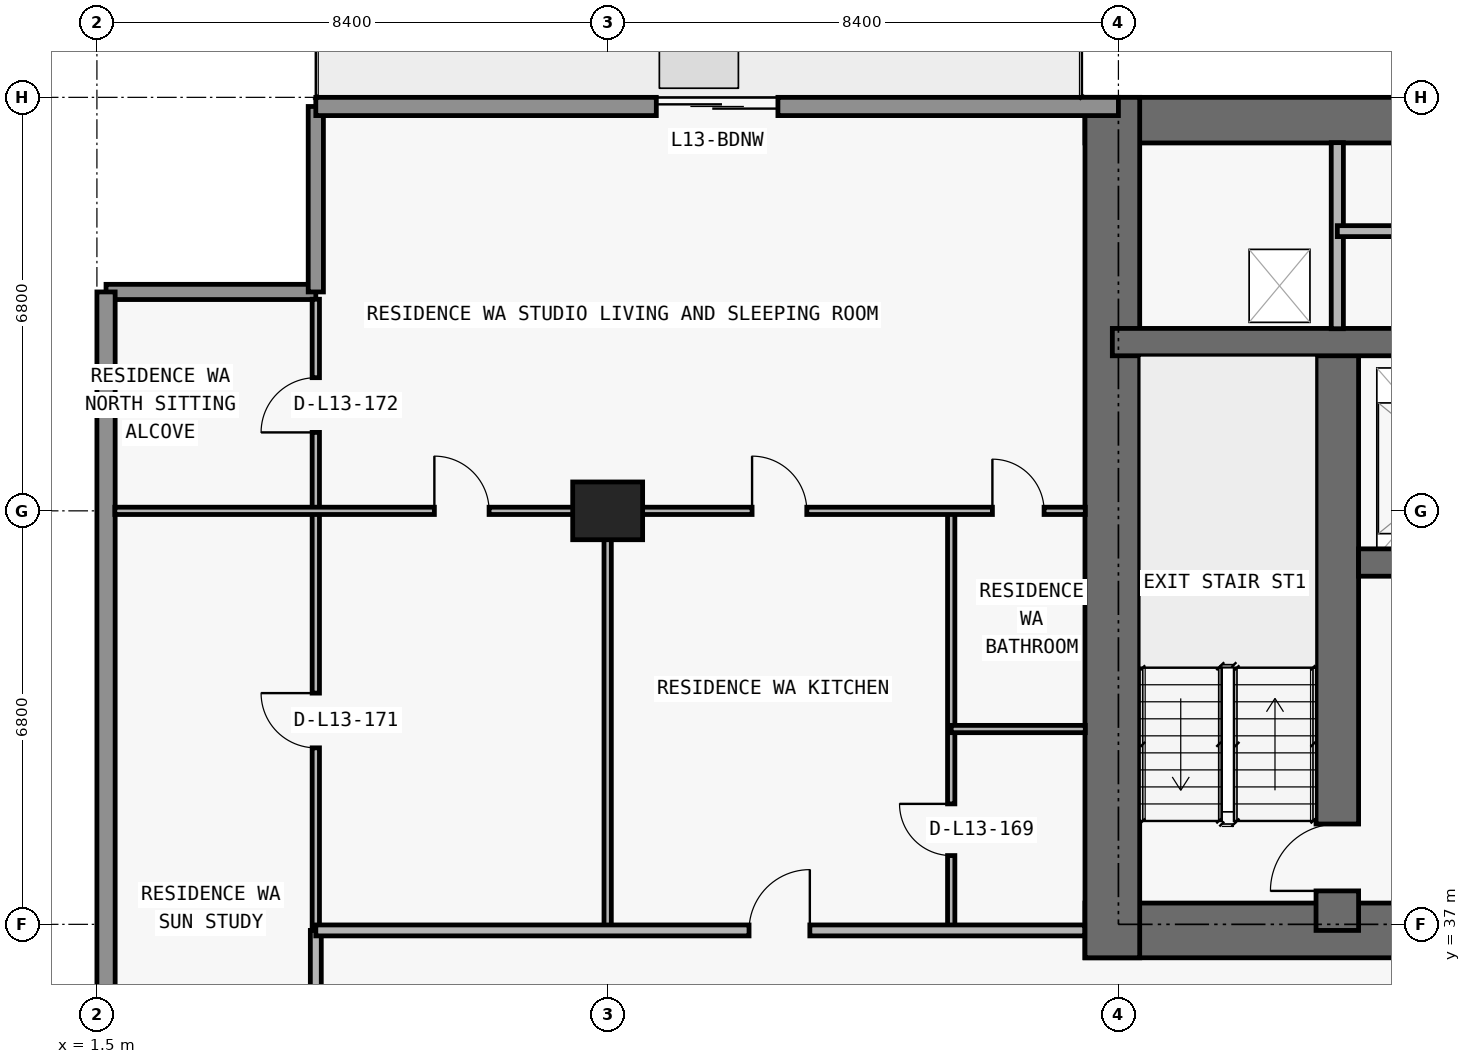
"""IFC4 building model, lengths in metres.
Left out: names, types, materials, properties, quantities, classifications, styles, units other than length and angle.
Written with IfcOpenShell. Run it as: python <this file> out.ifc"""

import sys

from ifc_helpers import new_model, si_unit, direction, frame, frame_2d, origin, origin_2d, place, context, subcontext, project, spatial, rectangle, extrude, element, fill, save


model = new_model("IFC4")
c1 = context("Model", 3, precision=1e-05, world=origin(), true_north=direction((0.0, 1.0)))
c2 = subcontext(c1, "Body", "Model", "MODEL_VIEW")
j1 = project(units=[si_unit("LENGTHUNIT", "METRE"), si_unit("PLANEANGLEUNIT", "RADIAN")], contexts=[c1])
p1 = place(None, origin())
s1 = spatial("IfcSite", under=j1, at=p1, CompositionType="ELEMENT")
p2 = place(p1, origin())
s2 = spatial("IfcBuilding", under=s1, at=p2, CompositionType="ELEMENT")
p3 = place(p2, frame((0.0, 0.0, 53.1)))
s3 = spatial("IfcBuildingStorey", under=s2, at=p3, CompositionType="ELEMENT", Elevation=53.1)
p4 = place(p3, frame((9.9, 43.8, 0.0), z_axis=(0.0, 0.0, 1.0), x_axis=(1.0, 0.0, 0.0)))
e1 = element("IfcColumn", 1, at=p4, inside=s3, PredefinedType="COLUMN", context=c2, shape_type="SweptSolid", body=[
    extrude(rectangle(XDim=1.15, YDim=0.95, at=origin_2d()), origin(), (0.0, 0.0, 1.0), 3.05),
])
p5 = place(p3, frame((17.75, 36.9, 0.0), z_axis=(0.0, 0.0, 1.0), x_axis=(1.0, 0.0, 0.0)))
e2 = element("IfcWall", 2, at=p5, inside=s3, PredefinedType="SHEAR", context=c2, shape_type="SweptSolid", body=[
    extrude(rectangle(XDim=42.3, YDim=0.9, at=frame_2d((21.15, 0.0))), origin(), (0.0, 0.0, 1.0), 3.05),
])
p6 = place(p5, frame((14.55, 0.0, 0.0)))
e3 = element("IfcOpeningElement", 3, at=p6, cuts=e2, PredefinedType="OPENING", context=c2, shape_type="SweptSolid", body=[
    extrude(rectangle(XDim=1.1, YDim=2.15, at=frame_2d((0.55, 1.075))), frame((0.0, 0.46, 0.0), z_axis=(0.0, -1.0, 0.0), x_axis=(1.0, 0.0, 0.0)), (0.0, 0.0, 1.0), 0.92),
])
p7 = place(p5, frame((6.4, 0.0, 0.0)))
e4 = element("IfcOpeningElement", 4, at=p7, cuts=e2, PredefinedType="OPENING", context=c2, shape_type="SweptSolid", body=[
    extrude(rectangle(XDim=1.05, YDim=2.15, at=frame_2d((0.525, 1.075))), frame((0.0, 0.46, 0.0), z_axis=(0.0, -1.0, 0.0), x_axis=(1.0, 0.0, 0.0)), (0.0, 0.0, 1.0), 0.92),
])
p8 = place(p5, frame((34.9, 0.0, 0.0)))
e5 = element("IfcOpeningElement", 5, at=p8, cuts=e2, PredefinedType="OPENING", context=c2, shape_type="SweptSolid", body=[
    extrude(rectangle(XDim=1.05, YDim=2.15, at=frame_2d((0.525, 1.075))), frame((0.0, 0.46, 0.0), z_axis=(0.0, -1.0, 0.0), x_axis=(1.0, 0.0, 0.0)), (0.0, 0.0, 1.0), 0.92),
])
p9 = place(p5, frame((11.012, 0.0, 0.0)))
e6 = element("IfcOpeningElement", 6, at=p9, cuts=e2, PredefinedType="OPENING", context=c2, shape_type="SweptSolid", body=[
    extrude(rectangle(XDim=1.05, YDim=2.15, at=frame_2d((0.525, 1.075))), frame((0.0, 0.46, 0.0), z_axis=(0.0, -1.0, 0.0), x_axis=(1.0, 0.0, 0.0)), (0.0, 0.0, 1.0), 0.92),
])
p10 = place(p5, frame((24.25, 0.0, 0.0)))
e7 = element("IfcOpeningElement", 7, at=p10, cuts=e2, PredefinedType="OPENING", context=c2, shape_type="SweptSolid", body=[
    extrude(rectangle(XDim=1.05, YDim=2.15, at=frame_2d((0.525, 1.075))), frame((0.0, 0.46, 0.0), z_axis=(0.0, -1.0, 0.0), x_axis=(1.0, 0.0, 0.0)), (0.0, 0.0, 1.0), 0.92),
])
p11 = place(p3, frame((17.75, 50.225, 0.0), z_axis=(0.0, 0.0, 1.0), x_axis=(1.0, 0.0, 0.0)))
e8 = element("IfcWall", 8, at=p11, inside=s3, PredefinedType="SHEAR", context=c2, shape_type="SweptSolid", body=[
    extrude(rectangle(XDim=42.3, YDim=0.75, at=frame_2d((21.15, 0.0))), origin(), (0.0, 0.0, 1.0), 3.05),
])
p12 = place(p3, frame((18.2, 36.45, 0.0), z_axis=(0.0, 0.0, 1.0), x_axis=(0.0, 1.0, 0.0)))
e9 = element("IfcWall", 9, at=p12, inside=s3, PredefinedType="SHEAR", context=c2, shape_type="SweptSolid", body=[
    extrude(rectangle(XDim=14.15, YDim=0.9, at=frame_2d((7.075, 0.0))), origin(), (0.0, 0.0, 1.0), 3.05),
])
p13 = place(p3, frame((21.9, 36.9, 0.0), z_axis=(0.0, 0.0, 1.0), x_axis=(0.0, 1.0, 0.0)))
e10 = element("IfcWall", 10, at=p13, inside=s3, PredefinedType="SHEAR", context=c2, shape_type="SweptSolid", body=[
    extrude(rectangle(XDim=9.675, YDim=0.7, at=frame_2d((4.837, 0.0))), origin(), (0.0, 0.0, 1.0), 3.05),
])
p14 = place(p13, frame((0.65, 0.0, 0.0)))
e11 = element("IfcOpeningElement", 11, at=p14, cuts=e10, PredefinedType="OPENING", context=c2, shape_type="SweptSolid", body=[
    extrude(rectangle(XDim=1.1, YDim=2.15, at=frame_2d((0.55, 1.075))), frame((0.0, 0.36, 0.0), z_axis=(0.0, -1.0, 0.0), x_axis=(1.0, 0.0, 0.0)), (0.0, 0.0, 1.0), 0.72),
])
p15 = place(p3, frame((22.25, 42.95, 0.0), z_axis=(0.0, 0.0, 1.0), x_axis=(1.0, 0.0, 0.0)))
e12 = element("IfcWall", 12, at=p15, inside=s3, PredefinedType="SHEAR", context=c2, shape_type="SweptSolid", body=[
    extrude(rectangle(XDim=33.3, YDim=0.45, at=frame_2d((16.65, 0.0))), origin(), (0.0, 0.0, 1.0), 3.05),
])
p16 = place(p15, frame((1.05, 0.0, 0.0)))
e13 = element("IfcOpeningElement", 13, at=p16, cuts=e12, PredefinedType="OPENING", context=c2, shape_type="SweptSolid", body=[
    extrude(rectangle(XDim=1.2, YDim=2.2, at=frame_2d((0.6, 1.1))), frame((0.0, 0.235, 0.0), z_axis=(0.0, -1.0, 0.0), x_axis=(1.0, 0.0, 0.0)), (0.0, 0.0, 1.0), 0.47),
])
p17 = place(p15, frame((31.05, 0.0, 0.0)))
e14 = element("IfcOpeningElement", 14, at=p17, cuts=e12, PredefinedType="OPENING", context=c2, shape_type="SweptSolid", body=[
    extrude(rectangle(XDim=1.2, YDim=2.2, at=frame_2d((0.6, 1.1))), frame((0.0, 0.235, 0.0), z_axis=(0.0, -1.0, 0.0), x_axis=(1.0, 0.0, 0.0)), (0.0, 0.0, 1.0), 0.47),
])
p18 = place(p15, frame((13.5, 0.0, 0.0)))
e15 = element("IfcOpeningElement", 15, at=p18, cuts=e12, PredefinedType="OPENING", context=c2, shape_type="SweptSolid", body=[
    extrude(rectangle(XDim=1.1, YDim=2.2, at=frame_2d((0.55, 1.1))), frame((0.0, 0.235, 0.0), z_axis=(0.0, -1.0, 0.0), x_axis=(1.0, 0.0, 0.0)), (0.0, 0.0, 1.0), 0.47),
])
p19 = place(p15, frame((16.1, 0.0, 0.0)))
e16 = element("IfcOpeningElement", 16, at=p19, cuts=e12, PredefinedType="OPENING", context=c2, shape_type="SweptSolid", body=[
    extrude(rectangle(XDim=1.1, YDim=2.2, at=frame_2d((0.55, 1.1))), frame((0.0, 0.235, 0.0), z_axis=(0.0, -1.0, 0.0), x_axis=(1.0, 0.0, 0.0)), (0.0, 0.0, 1.0), 0.47),
])
p20 = place(p15, frame((18.7, 0.0, 0.0)))
e17 = element("IfcOpeningElement", 17, at=p20, cuts=e12, PredefinedType="OPENING", context=c2, shape_type="SweptSolid", body=[
    extrude(rectangle(XDim=1.1, YDim=2.2, at=frame_2d((0.55, 1.1))), frame((0.0, 0.235, 0.0), z_axis=(0.0, -1.0, 0.0), x_axis=(1.0, 0.0, 0.0)), (0.0, 0.0, 1.0), 0.47),
])
p21 = place(p15, frame((3.625, 0.0, 0.0)))
e18 = element("IfcOpeningElement", 18, at=p21, cuts=e12, PredefinedType="OPENING", context=c2, shape_type="SweptSolid", body=[
    extrude(rectangle(XDim=1.05, YDim=2.15, at=frame_2d((0.525, 1.075))), frame((0.0, 0.235, 0.0), z_axis=(0.0, -1.0, 0.0), x_axis=(1.0, 0.0, 0.0)), (0.0, 0.0, 1.0), 0.47),
])
p22 = place(p15, frame((28.675, 0.0, 0.0)))
e19 = element("IfcOpeningElement", 19, at=p22, cuts=e12, PredefinedType="OPENING", context=c2, shape_type="SweptSolid", body=[
    extrude(rectangle(XDim=1.05, YDim=2.15, at=frame_2d((0.525, 1.075))), frame((0.0, 0.235, 0.0), z_axis=(0.0, -1.0, 0.0), x_axis=(1.0, 0.0, 0.0)), (0.0, 0.0, 1.0), 0.47),
])
p23 = place(p3, frame((18.2, 46.575, 0.0), z_axis=(0.0, 0.0, 1.0), x_axis=(1.0, 0.0, 0.0)))
e20 = element("IfcWall", 20, at=p23, inside=s3, PredefinedType="SHEAR", context=c2, shape_type="SweptSolid", body=[
    extrude(rectangle(XDim=41.4, YDim=0.45, at=frame_2d((20.7, 0.0))), origin(), (0.0, 0.0, 1.0), 3.05),
])
p24 = place(p23, frame((7.675, 0.0, 0.0)))
e21 = element("IfcOpeningElement", 21, at=p24, cuts=e20, PredefinedType="OPENING", context=c2, shape_type="SweptSolid", body=[
    extrude(rectangle(XDim=1.05, YDim=2.15, at=frame_2d((0.525, 1.075))), frame((0.0, 0.235, 0.0), z_axis=(0.0, -1.0, 0.0), x_axis=(1.0, 0.0, 0.0)), (0.0, 0.0, 1.0), 0.47),
])
p25 = place(p23, frame((32.725, 0.0, 0.0)))
e22 = element("IfcOpeningElement", 22, at=p25, cuts=e20, PredefinedType="OPENING", context=c2, shape_type="SweptSolid", body=[
    extrude(rectangle(XDim=1.05, YDim=2.15, at=frame_2d((0.525, 1.075))), frame((0.0, 0.235, 0.0), z_axis=(0.0, -1.0, 0.0), x_axis=(1.0, 0.0, 0.0)), (0.0, 0.0, 1.0), 0.47),
])
p26 = place(p3, frame((1.65, 47.4, 0.0), z_axis=(0.0, 0.0, 1.0), x_axis=(1.0, 0.0, 0.0)))
e23 = element("IfcWall", 23, at=p26, inside=s3, PredefinedType="ELEMENTEDWALL", context=c2, shape_type="SweptSolid", body=[
    extrude(rectangle(XDim=3.45, YDim=0.25, at=frame_2d((1.725, 0.0))), origin(), (0.0, 0.0, 1.0), 3.05),
])
p27 = place(p3, frame((5.1, 47.4, 0.0), z_axis=(0.0, 0.0, 1.0), x_axis=(0.0, 1.0, 0.0)))
e24 = element("IfcWall", 24, at=p27, inside=s3, PredefinedType="ELEMENTEDWALL", context=c2, shape_type="SweptSolid", body=[
    extrude(rectangle(XDim=3.05, YDim=0.25, at=frame_2d((1.525, 0.0))), origin(), (0.0, 0.0, 1.0), 3.05),
])
p28 = place(p3, frame((1.65, 26.8, 0.0), z_axis=(0.0, 0.0, 1.0), x_axis=(0.0, 1.0, 0.0)))
e25 = element("IfcWall", 25, at=p28, inside=s3, PredefinedType="STANDARD", context=c2, shape_type="SweptSolid", body=[
    extrude(rectangle(XDim=20.6, YDim=0.3, at=frame_2d((10.3, 0.0))), origin(), (0.0, 0.0, 1.0), 3.05),
])
p29 = place(p3, frame((5.1, 50.45, 0.0), z_axis=(0.0, 0.0, 1.0), x_axis=(1.0, 0.0, 0.0)))
e26 = element("IfcWall", 26, at=p29, inside=s3, PredefinedType="STANDARD", context=c2, shape_type="SweptSolid", body=[
    extrude(rectangle(XDim=13.2, YDim=0.3, at=frame_2d((6.6, 0.0))), origin(), (0.0, 0.0, 1.0), 3.05),
])
p30 = place(p29, frame((5.6, 0.0, 0.0)))
e27 = element("IfcOpeningElement", 27, at=p30, cuts=e26, PredefinedType="OPENING", context=c2, shape_type="SweptSolid", body=[
    extrude(rectangle(XDim=2.0, YDim=2.3, at=frame_2d((1.0, 1.15))), frame((0.0, 0.16, 0.0), z_axis=(0.0, -1.0, 0.0), x_axis=(1.0, 0.0, 0.0)), (0.0, 0.0, 1.0), 0.32),
])
p31 = place(p3, frame((5.1, 34.605, 0.0), z_axis=(0.0, 0.0, 1.0), x_axis=(0.0, 1.0, 0.0)))
e28 = element("IfcWall", 28, at=p31, inside=s3, PredefinedType="PARTITIONING", context=c2, shape_type="SweptSolid", body=[
    extrude(rectangle(XDim=2.295, YDim=0.18, at=frame_2d((1.147, 0.0))), origin(), (0.0, 0.0, 1.0), 3.05),
])
p32 = place(p3, frame((5.1, 36.905, 0.0), z_axis=(0.0, 0.0, 1.0), x_axis=(0.0, 1.0, 0.0)))
e29 = element("IfcWall", 29, at=p32, inside=s3, PredefinedType="PARTITIONING", context=c2, shape_type="SweptSolid", body=[
    extrude(rectangle(XDim=10.375, YDim=0.12, at=frame_2d((5.188, 0.0))), origin(), (0.0, 0.0, 1.0), 3.05),
])
p33 = place(p32, frame((2.998, 0.0, 0.0)))
e30 = element("IfcOpeningElement", 30, at=p33, cuts=e29, PredefinedType="OPENING", context=c2, shape_type="SweptSolid", body=[
    extrude(rectangle(XDim=0.9, YDim=2.15, at=frame_2d((0.45, 1.075))), frame((0.0, 0.07, 0.0), z_axis=(0.0, -1.0, 0.0), x_axis=(1.0, 0.0, 0.0)), (0.0, 0.0, 1.0), 0.14),
])
p34 = place(p32, frame((8.185, 0.0, 0.0)))
e31 = element("IfcOpeningElement", 31, at=p34, cuts=e29, PredefinedType="OPENING", context=c2, shape_type="SweptSolid", body=[
    extrude(rectangle(XDim=0.9, YDim=2.15, at=frame_2d((0.45, 1.075))), frame((0.0, 0.07, 0.0), z_axis=(0.0, -1.0, 0.0), x_axis=(1.0, 0.0, 0.0)), (0.0, 0.0, 1.0), 0.14),
])
p35 = place(p3, frame((9.9, 36.9, 0.0), z_axis=(0.0, 0.0, 1.0), x_axis=(0.0, 1.0, 0.0)))
e32 = element("IfcWall", 32, at=p35, inside=s3, PredefinedType="PARTITIONING", context=c2, shape_type="SweptSolid", body=[
    extrude(rectangle(XDim=6.9, YDim=0.12, at=frame_2d((3.45, 0.0))), origin(), (0.0, 0.0, 1.0), 2.11),
])
p36 = place(p3, frame((15.55, 36.9, 0.0), z_axis=(0.0, 0.0, 1.0), x_axis=(0.0, 1.0, 0.0)))
e33 = element("IfcWall", 33, at=p36, inside=s3, PredefinedType="PARTITIONING", context=c2, shape_type="SweptSolid", body=[
    extrude(rectangle(XDim=6.9, YDim=0.12, at=frame_2d((3.45, 0.0))), origin(), (0.0, 0.0, 1.0), 3.05),
])
p37 = place(p36, frame((1.231, 0.0, 0.0)))
e34 = element("IfcOpeningElement", 34, at=p37, cuts=e33, PredefinedType="OPENING", context=c2, shape_type="SweptSolid", body=[
    extrude(rectangle(XDim=0.85, YDim=2.1, at=frame_2d((0.425, 1.05))), frame((0.0, 0.07, 0.0), z_axis=(0.0, -1.0, 0.0), x_axis=(1.0, 0.0, 0.0)), (0.0, 0.0, 1.0), 0.14),
])
p38 = place(p3, frame((21.9, 46.795, 0.0), z_axis=(0.0, 0.0, 1.0), x_axis=(0.0, 1.0, 0.0)))
e35 = element("IfcWall", 35, at=p38, inside=s3, PredefinedType="PARTITIONING", context=c2, shape_type="SweptSolid", body=[
    extrude(rectangle(XDim=3.06, YDim=0.2, at=frame_2d((1.53, 0.0))), origin(), (0.0, 0.0, 1.0), 3.05),
])
p39 = place(p3, frame((5.1, 36.9, 0.0), z_axis=(0.0, 0.0, 1.0), x_axis=(1.0, 0.0, 0.0)))
e36 = element("IfcWall", 36, at=p39, inside=s3, PredefinedType="PARTITIONING", context=c2, shape_type="SweptSolid", body=[
    extrude(rectangle(XDim=12.645, YDim=0.18, at=frame_2d((6.323, 0.0))), origin(), (0.0, 0.0, 1.0), 3.05),
])
p40 = place(p39, frame((7.125, 0.0, 0.0)))
e37 = element("IfcOpeningElement", 37, at=p40, cuts=e36, PredefinedType="OPENING", context=c2, shape_type="SweptSolid", body=[
    extrude(rectangle(XDim=1.0, YDim=2.2, at=frame_2d((0.5, 1.1))), frame((0.0, 0.1, 0.0), z_axis=(0.0, -1.0, 0.0), x_axis=(1.0, 0.0, 0.0)), (0.0, 0.0, 1.0), 0.2),
])
p41 = place(p3, frame((15.55, 40.212, 0.0), z_axis=(0.0, 0.0, 1.0), x_axis=(1.0, 0.0, 0.0)))
e38 = element("IfcWall", 38, at=p41, inside=s3, PredefinedType="PARTITIONING", context=c2, shape_type="SweptSolid", body=[
    extrude(rectangle(XDim=2.205, YDim=0.12, at=frame_2d((1.103, 0.0))), origin(), (0.0, 0.0, 1.0), 3.05),
])
p42 = place(p3, frame((1.795, 43.8, 0.0), z_axis=(0.0, 0.0, 1.0), x_axis=(1.0, 0.0, 0.0)))
e39 = element("IfcWall", 39, at=p42, inside=s3, PredefinedType="PARTITIONING", context=c2, shape_type="SweptSolid", body=[
    extrude(rectangle(XDim=15.96, YDim=0.12, at=frame_2d((7.98, 0.0))), origin(), (0.0, 0.0, 1.0), 2.339),
])
p43 = place(p42, frame((5.255, 0.0, 0.0)))
e40 = element("IfcOpeningElement", 40, at=p43, cuts=e39, PredefinedType="OPENING", context=c2, shape_type="SweptSolid", body=[
    extrude(rectangle(XDim=0.9, YDim=2.15, at=frame_2d((0.45, 1.075))), frame((0.0, 0.07, 0.0), z_axis=(0.0, -1.0, 0.0), x_axis=(1.0, 0.0, 0.0)), (0.0, 0.0, 1.0), 0.14),
])
p44 = place(p42, frame((10.48, 0.0, 0.0)))
e41 = element("IfcOpeningElement", 41, at=p44, cuts=e39, PredefinedType="OPENING", context=c2, shape_type="SweptSolid", body=[
    extrude(rectangle(XDim=0.9, YDim=2.15, at=frame_2d((0.45, 1.075))), frame((0.0, 0.07, 0.0), z_axis=(0.0, -1.0, 0.0), x_axis=(1.0, 0.0, 0.0)), (0.0, 0.0, 1.0), 0.14),
])
p45 = place(p42, frame((14.433, 0.0, 0.0)))
e42 = element("IfcOpeningElement", 42, at=p45, cuts=e39, PredefinedType="OPENING", context=c2, shape_type="SweptSolid", body=[
    extrude(rectangle(XDim=0.85, YDim=2.1, at=frame_2d((0.425, 1.05))), frame((0.0, 0.07, 0.0), z_axis=(0.0, -1.0, 0.0), x_axis=(1.0, 0.0, 0.0)), (0.0, 0.0, 1.0), 0.14),
])
p46 = place(p3, frame((21.9, 48.4, 0.0), z_axis=(0.0, 0.0, 1.0), x_axis=(1.0, 0.0, 0.0)))
e43 = element("IfcWall", 43, at=p46, inside=s3, PredefinedType="PARTITIONING", context=c2, shape_type="SweptSolid", body=[
    extrude(rectangle(XDim=34.0, YDim=0.18, at=frame_2d((17.0, 0.0))), origin(), (0.0, 0.0, 1.0), 3.05),
])
p47 = place(p46, frame((8.0, 0.0, 0.0)))
e44 = element("IfcOpeningElement", 44, at=p47, cuts=e43, PredefinedType="OPENING", context=c2, shape_type="SweptSolid", body=[
    extrude(rectangle(XDim=1.0, YDim=2.2, at=frame_2d((0.5, 1.1))), frame((0.0, 0.1, 0.0), z_axis=(0.0, -1.0, 0.0), x_axis=(1.0, 0.0, 0.0)), (0.0, 0.0, 1.0), 0.2),
])
p48 = place(p46, frame((25.0, 0.0, 0.0)))
e45 = element("IfcOpeningElement", 45, at=p48, cuts=e43, PredefinedType="OPENING", context=c2, shape_type="SweptSolid", body=[
    extrude(rectangle(XDim=1.0, YDim=2.2, at=frame_2d((0.5, 1.1))), frame((0.0, 0.1, 0.0), z_axis=(0.0, -1.0, 0.0), x_axis=(1.0, 0.0, 0.0)), (0.0, 0.0, 1.0), 0.2),
])
p49 = place(p30, origin())
e46 = element("IfcDoor", 46, at=p49, inside=s3, OperationType="DOUBLE_DOOR_SLIDING", PredefinedType="DOOR", context=c2, shape_type="SweptSolid", body=[
    extrude(rectangle(XDim=2.0, YDim=2.3, at=frame_2d((1.0, 1.15))), frame((0.0, 0.025, 0.0), z_axis=(0.0, -1.0, 0.0), x_axis=(1.0, 0.0, 0.0)), (0.0, 0.0, 1.0), 0.05),
])
fill(e27, e46)
p50 = place(p14, origin())
e47 = element("IfcDoor", 47, at=p50, inside=s3, OperationType="SINGLE_SWING_LEFT", PredefinedType="DOOR", context=c2, shape_type="SweptSolid", body=[
    extrude(rectangle(XDim=1.1, YDim=2.15, at=frame_2d((0.55, 1.075))), frame((0.0, 0.025, 0.0), z_axis=(0.0, -1.0, 0.0), x_axis=(1.0, 0.0, 0.0)), (0.0, 0.0, 1.0), 0.05),
])
fill(e11, e47)
p51 = place(p43, origin())
e48 = element("IfcDoor", 48, at=p51, inside=s3, OperationType="SINGLE_SWING_LEFT", PredefinedType="DOOR", context=c2, shape_type="SweptSolid", body=[
    extrude(rectangle(XDim=0.9, YDim=2.15, at=frame_2d((0.45, 1.075))), frame((0.0, 0.025, 0.0), z_axis=(0.0, -1.0, 0.0), x_axis=(1.0, 0.0, 0.0)), (0.0, 0.0, 1.0), 0.05),
])
fill(e40, e48)
p52 = place(p40, origin())
e49 = element("IfcDoor", 49, at=p52, inside=s3, OperationType="SINGLE_SWING_RIGHT", PredefinedType="DOOR", context=c2, shape_type="SweptSolid", body=[
    extrude(rectangle(XDim=1.0, YDim=2.2, at=frame_2d((0.5, 1.1))), frame((0.0, 0.025, 0.0), z_axis=(0.0, -1.0, 0.0), x_axis=(1.0, 0.0, 0.0)), (0.0, 0.0, 1.0), 0.05),
])
fill(e37, e49)
p53 = place(p44, origin())
e50 = element("IfcDoor", 50, at=p53, inside=s3, OperationType="SINGLE_SWING_LEFT", PredefinedType="DOOR", context=c2, shape_type="SweptSolid", body=[
    extrude(rectangle(XDim=0.9, YDim=2.15, at=frame_2d((0.45, 1.075))), frame((0.0, 0.025, 0.0), z_axis=(0.0, -1.0, 0.0), x_axis=(1.0, 0.0, 0.0)), (0.0, 0.0, 1.0), 0.05),
])
fill(e41, e50)
p54 = place(p37, origin())
e51 = element("IfcDoor", 51, at=p54, inside=s3, OperationType="SINGLE_SWING_RIGHT", PredefinedType="DOOR", context=c2, shape_type="SweptSolid", body=[
    extrude(rectangle(XDim=0.85, YDim=2.1, at=frame_2d((0.425, 1.05))), frame((0.0, 0.025, 0.0), z_axis=(0.0, -1.0, 0.0), x_axis=(1.0, 0.0, 0.0)), (0.0, 0.0, 1.0), 0.05),
])
fill(e34, e51)
p55 = place(p45, origin())
e52 = element("IfcDoor", 52, at=p55, inside=s3, OperationType="SINGLE_SWING_LEFT", PredefinedType="DOOR", context=c2, shape_type="SweptSolid", body=[
    extrude(rectangle(XDim=0.85, YDim=2.1, at=frame_2d((0.425, 1.05))), frame((0.0, 0.025, 0.0), z_axis=(0.0, -1.0, 0.0), x_axis=(1.0, 0.0, 0.0)), (0.0, 0.0, 1.0), 0.05),
])
fill(e42, e52)
p56 = place(p33, origin())
e53 = element("IfcDoor", 53, at=p56, inside=s3, OperationType="SINGLE_SWING_RIGHT", PredefinedType="DOOR", context=c2, shape_type="SweptSolid", body=[
    extrude(rectangle(XDim=0.9, YDim=2.15, at=frame_2d((0.45, 1.075))), frame((0.0, 0.025, 0.0), z_axis=(0.0, -1.0, 0.0), x_axis=(1.0, 0.0, 0.0)), (0.0, 0.0, 1.0), 0.05),
])
fill(e30, e53)
p57 = place(p34, origin())
e54 = element("IfcDoor", 54, at=p57, inside=s3, OperationType="SINGLE_SWING_LEFT", PredefinedType="DOOR", context=c2, shape_type="SweptSolid", body=[
    extrude(rectangle(XDim=0.9, YDim=2.15, at=frame_2d((0.45, 1.075))), frame((0.0, 0.025, 0.0), z_axis=(0.0, -1.0, 0.0), x_axis=(1.0, 0.0, 0.0)), (0.0, 0.0, 1.0), 0.05),
])
fill(e31, e54)
save(model, sys.argv[1])
